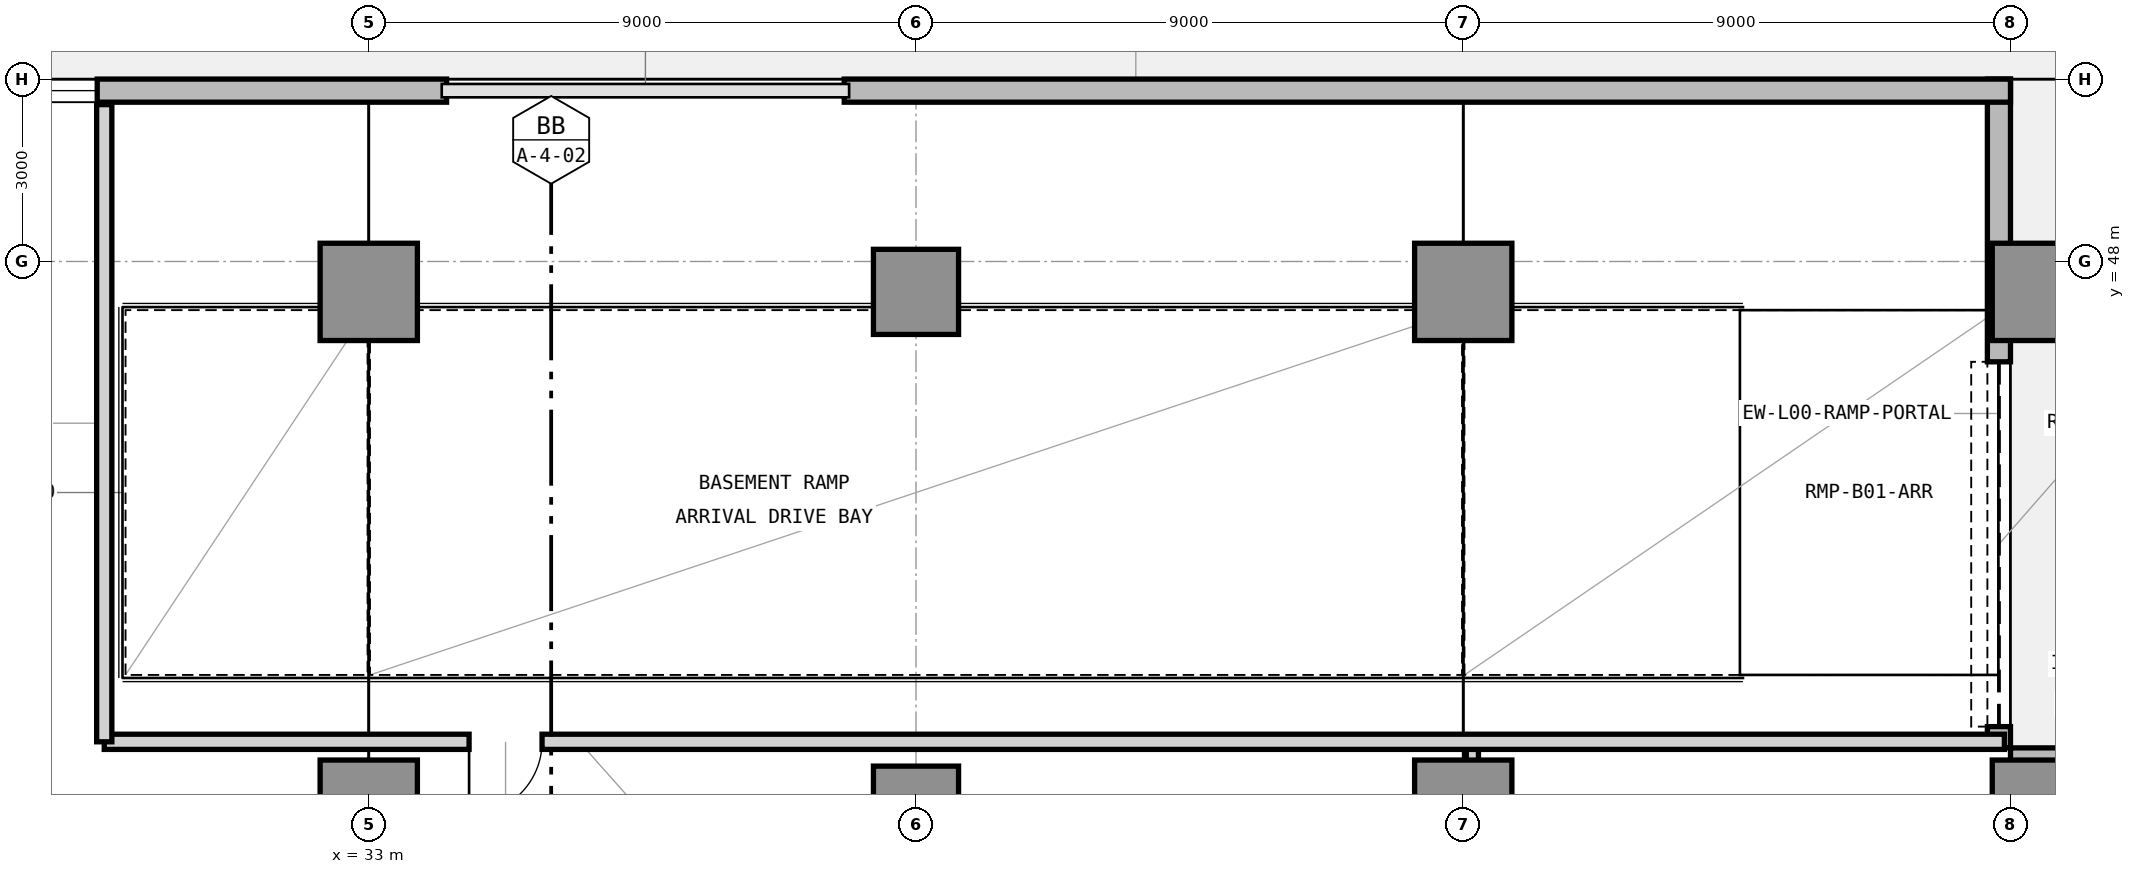
"""IFC4 building model, lengths in metres.
Left out: names, types, materials, properties, quantities, classifications, styles, units other than length and angle.
Written with IfcOpenShell. Run it as: python <this file> out.ifc"""

import sys

from ifc_helpers import new_model, si_unit, direction, frame, frame_2d, origin, origin_2d, place, context, subcontext, project, spatial, rectangle, extrude, element, fill, save


model = new_model("IFC4")
c1 = context("Model", 3, precision=1e-05, world=origin(), true_north=direction((0.0, 1.0)))
c2 = subcontext(c1, "Body", "Model", "MODEL_VIEW")
j1 = project(units=[si_unit("LENGTHUNIT", "METRE"), si_unit("PLANEANGLEUNIT", "RADIAN")], contexts=[c1])
p1 = place(None, origin())
s1 = spatial("IfcSite", under=j1, at=p1, CompositionType="ELEMENT")
p2 = place(p1, origin())
s2 = spatial("IfcBuilding", under=s1, at=p2, CompositionType="ELEMENT")
p3 = place(p2, origin())
s3 = spatial("IfcBuildingStorey", under=s2, at=p3, CompositionType="ELEMENT", Elevation=0.0)
for number, where, z_axis, x_axis in (
    (1, (33.0, 39.0, 0.0), (0.0, 0.0, 1.0), (1.0, 0.0, 0.0)),
    (2, (33.0, 47.5, 0.0), (0.0, 0.0, 1.0), (1.0, 0.0, 0.0)),
):
    element("IfcColumn", number, at=place(p3, frame(where, z_axis=z_axis, x_axis=x_axis)), inside=s3, PredefinedType="COLUMN", context=c2, shape_type="SweptSolid", body=[
        extrude(rectangle(XDim=1.6, YDim=1.6, at=origin_2d()), origin(), (0.0, 0.0, 1.0), 5.4),
    ])
for number, where, z_axis, x_axis in (
    (3, (42.0, 39.0, 0.0), (0.0, 0.0, 1.0), (1.0, 0.0, 0.0)),
    (4, (42.0, 47.5, 0.0), (0.0, 0.0, 1.0), (1.0, 0.0, 0.0)),
):
    element("IfcColumn", number, at=place(p3, frame(where, z_axis=z_axis, x_axis=x_axis)), inside=s3, PredefinedType="COLUMN", context=c2, shape_type="SweptSolid", body=[
        extrude(rectangle(XDim=1.4, YDim=1.4, at=origin_2d()), origin(), (0.0, 0.0, 1.0), 5.4),
    ])
for number, where, z_axis, x_axis in (
    (5, (51.0, 39.0, 0.0), (0.0, 0.0, 1.0), (1.0, 0.0, 0.0)),
    (6, (51.0, 47.5, 0.0), (0.0, 0.0, 1.0), (1.0, 0.0, 0.0)),
    (7, (60.5, 39.0, 0.0), (0.0, 0.0, 1.0), (1.0, 0.0, 0.0)),
    (8, (60.5, 47.5, 0.0), (0.0, 0.0, 1.0), (1.0, 0.0, 0.0)),
):
    element("IfcColumn", number, at=place(p3, frame(where, z_axis=z_axis, x_axis=x_axis)), inside=s3, PredefinedType="COLUMN", context=c2, shape_type="SweptSolid", body=[
        extrude(rectangle(XDim=1.6, YDim=1.6, at=origin_2d()), origin(), (0.0, 0.0, 1.0), 5.4),
    ])
p4 = place(p3, frame((72.0, 39.81, 0.0), z_axis=(0.0, 0.0, 1.0), x_axis=(-1.0, 0.0, 0.0)))
e9 = element("IfcWall", 9, at=p4, inside=s3, PredefinedType="STANDARD", context=c2, shape_type="SweptSolid", body=[
    extrude(rectangle(XDim=12.0, YDim=0.38, at=frame_2d((6.0, 0.0))), origin(), (0.0, 0.0, 1.0), 5.1),
])
p5 = place(p3, frame((59.81, 40.0, 0.0), z_axis=(0.0, 0.0, 1.0), x_axis=(0.0, 1.0, 0.0)))
e10 = element("IfcWall", 10, at=p5, inside=s3, PredefinedType="STANDARD", context=c2, shape_type="SweptSolid", body=[
    extrude(rectangle(XDim=11.0, YDim=0.38, at=frame_2d((5.5, 0.0))), origin(), (0.0, 0.0, 1.0), 5.1),
])
p6 = place(p5, frame((0.35, 0.0, 0.0)))
e11 = element("IfcOpeningElement", 11, at=p6, cuts=e10, PredefinedType="OPENING", context=c2, shape_type="SweptSolid", body=[
    extrude(rectangle(XDim=6.0, YDim=3.2, at=frame_2d((3.0, 1.6))), frame((0.0, 0.2, 0.0), z_axis=(0.0, -1.0, 0.0), x_axis=(1.0, 0.0, 0.0)), (0.0, 0.0, 1.0), 0.4),
])
p7 = place(p3, frame((60.0, 50.81, 0.0), z_axis=(0.0, 0.0, 1.0), x_axis=(-1.0, 0.0, 0.0)))
e12 = element("IfcWall", 12, at=p7, inside=s3, PredefinedType="STANDARD", context=c2, shape_type="SweptSolid", body=[
    extrude(rectangle(XDim=19.18, YDim=0.38, at=frame_2d((9.59, 0.0))), origin(), (0.0, 0.0, 1.0), 5.1),
])
p8 = place(p3, frame((34.28, 50.81, 0.0), z_axis=(0.0, 0.0, 1.0), x_axis=(-1.0, 0.0, 0.0)))
e13 = element("IfcWall", 13, at=p8, inside=s3, PredefinedType="STANDARD", context=c2, shape_type="SweptSolid", body=[
    extrude(rectangle(XDim=34.28, YDim=0.38, at=frame_2d((17.14, 0.0))), origin(), (0.0, 0.0, 1.0), 5.1),
])
p9 = place(p8, frame((19.68, 0.0, 0.0)))
e14 = element("IfcOpeningElement", 14, at=p9, cuts=e13, PredefinedType="OPENING", context=c2, shape_type="SweptSolid", body=[
    extrude(rectangle(XDim=2.4, YDim=2.8, at=frame_2d((1.2, 1.4))), frame((0.0, 0.2, 0.0), z_axis=(0.0, -1.0, 0.0), x_axis=(1.0, 0.0, 0.0)), (0.0, 0.0, 1.0), 0.4),
])
p10 = place(p8, frame((5.746, 0.0, 0.9)))
e15 = element("IfcOpeningElement", 15, at=p10, cuts=e13, PredefinedType="OPENING", context=c2, shape_type="SweptSolid", body=[
    extrude(rectangle(XDim=3.2, YDim=3.1, at=frame_2d((1.6, 1.55))), frame((0.0, 0.2, 0.0), z_axis=(0.0, -1.0, 0.0), x_axis=(1.0, 0.0, 0.0)), (0.0, 0.0, 1.0), 0.4),
])
p11 = place(p3, frame((51.15, 30.0, 0.0), z_axis=(0.0, 0.0, 1.0), x_axis=(0.0, 1.0, 0.0)))
e16 = element("IfcWall", 16, at=p11, inside=s3, PredefinedType="PARTITIONING", context=c2, shape_type="SweptSolid", body=[
    extrude(rectangle(XDim=10.15, YDim=0.2, at=frame_2d((5.075, 0.0))), origin(), (0.0, 0.0, 1.0), 4.234),
])
p12 = place(p11, frame((3.8, 0.0, 0.0)))
e17 = element("IfcOpeningElement", 17, at=p12, cuts=e16, PredefinedType="OPENING", context=c2, shape_type="SweptSolid", body=[
    extrude(rectangle(XDim=2.0, YDim=2.5, at=frame_2d((1.0, 1.25))), frame((0.0, 0.11, 0.0), z_axis=(0.0, -1.0, 0.0), x_axis=(1.0, 0.0, 0.0)), (0.0, 0.0, 1.0), 0.22),
])
p13 = place(p3, frame((28.65, 40.1, 0.0), z_axis=(0.0, 0.0, 1.0), x_axis=(1.0, 0.0, 0.0)))
e18 = element("IfcWall", 18, at=p13, inside=s3, PredefinedType="PARTITIONING", context=c2, shape_type="SweptSolid", body=[
    extrude(rectangle(XDim=31.25, YDim=0.25, at=frame_2d((15.625, 0.0))), origin(), (0.0, 0.0, 1.0), 5.09),
])
p14 = place(p13, frame((6.0, 0.0, 0.0)))
e19 = element("IfcOpeningElement", 19, at=p14, cuts=e18, PredefinedType="OPENING", context=c2, shape_type="SweptSolid", body=[
    extrude(rectangle(XDim=1.2, YDim=2.2, at=frame_2d((0.6, 1.1))), frame((0.0, 0.135, 0.0), z_axis=(0.0, -1.0, 0.0), x_axis=(1.0, 0.0, 0.0)), (0.0, 0.0, 1.0), 0.27),
])
p15 = place(p3, frame((28.65, 40.1, 0.0), z_axis=(0.0, 0.0, 1.0), x_axis=(0.0, 1.0, 0.0)))
e20 = element("IfcWall", 20, at=p15, inside=s3, PredefinedType="PARTITIONING", context=c2, shape_type="SweptSolid", body=[
    extrude(rectangle(XDim=10.48, YDim=0.25, at=frame_2d((5.24, 0.0))), origin(), (0.0, 0.0, 1.0), 5.09),
])
p16 = place(p6, frame((6.0, 0.0, 0.0), z_axis=(0.0, 0.0, 1.0), x_axis=(-1.0, 0.0, 0.0)))
e21 = element("IfcDoor", 21, at=p16, inside=s3, OperationType="ROLLINGUP", PredefinedType="DOOR", context=c2, shape_type="SweptSolid", body=[
    extrude(rectangle(XDim=6.0, YDim=3.2, at=frame_2d((3.0, 1.6))), frame((0.0, 0.025, 0.0), z_axis=(0.0, -1.0, 0.0), x_axis=(1.0, 0.0, 0.0)), (0.0, 0.0, 1.0), 0.05),
])
fill(e11, e21)
p17 = place(p10, origin())
e22 = element("IfcWindow", 22, at=p17, inside=s3, PartitioningType="SINGLE_PANEL", PredefinedType="WINDOW", context=c2, shape_type="SweptSolid", body=[
    extrude(rectangle(XDim=3.2, YDim=3.1, at=frame_2d((1.6, 1.55))), frame((0.0, 0.11, 0.0), z_axis=(0.0, -1.0, 0.0), x_axis=(1.0, 0.0, 0.0)), (0.0, 0.0, 1.0), 0.06),
])
fill(e15, e22)
p18 = place(p14, frame((1.2, 0.0, 0.0), z_axis=(0.0, 0.0, 1.0), x_axis=(-1.0, 0.0, 0.0)))
e23 = element("IfcDoor", 23, at=p18, inside=s3, OperationType="SINGLE_SWING_RIGHT", PredefinedType="DOOR", context=c2, shape_type="SweptSolid", body=[
    extrude(rectangle(XDim=1.2, YDim=2.2, at=frame_2d((0.6, 1.1))), frame((0.0, 0.025, 0.0), z_axis=(0.0, -1.0, 0.0), x_axis=(1.0, 0.0, 0.0)), (0.0, 0.0, 1.0), 0.05),
])
fill(e19, e23)
save(model, sys.argv[1])
